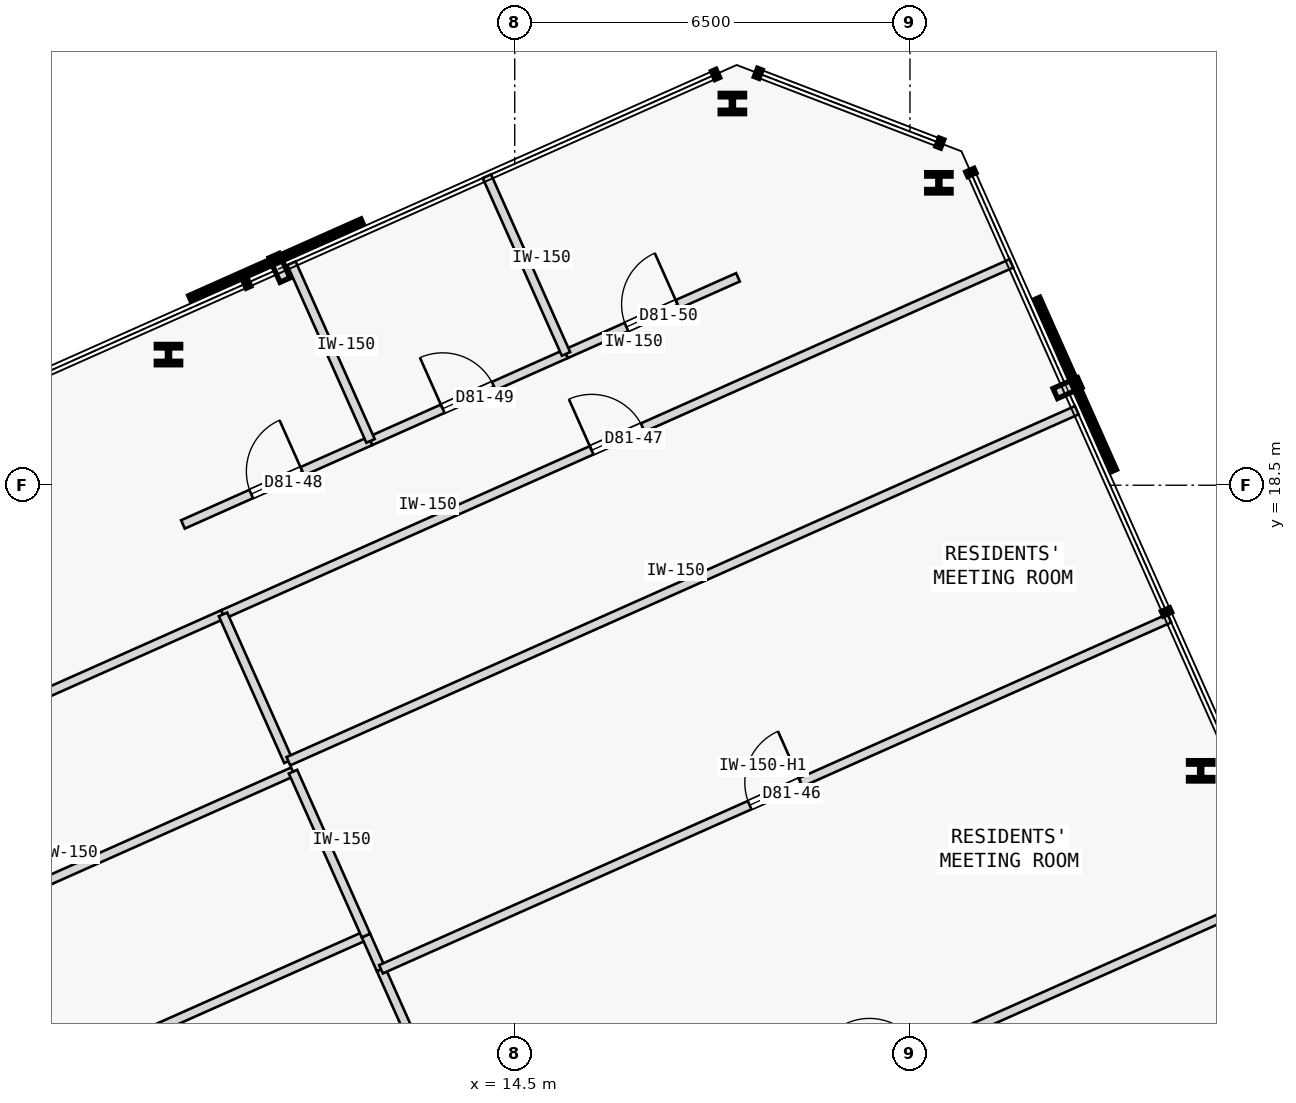
"""IFC4 building model, lengths in metres.
Left out: names, types, materials, properties, quantities, classifications, styles, units other than length and angle.
Written with IfcOpenShell. Run it as: python <this file> out.ifc"""

import sys

from ifc_helpers import new_model, si_unit, direction, frame, frame_2d, origin, origin_2d, place, context, subcontext, project, spatial, rectangle, i_section, extrude, element, fill, save


model = new_model("IFC4")
c1 = context("Model", 3, precision=1e-05, world=origin(), true_north=direction((0.0, 1.0)))
c2 = subcontext(c1, "Body", "Model", "MODEL_VIEW")
j1 = project(units=[si_unit("LENGTHUNIT", "METRE"), si_unit("PLANEANGLEUNIT", "RADIAN")], contexts=[c1])
p1 = place(None, origin())
s1 = spatial("IfcSite", under=j1, at=p1, CompositionType="ELEMENT")
p2 = place(p1, origin())
s2 = spatial("IfcBuilding", under=s1, at=p2, CompositionType="ELEMENT")
p3 = place(p2, frame((0.0, 0.0, 302.0)))
s3 = spatial("IfcBuildingStorey", under=s2, at=p3, CompositionType="ELEMENT", Elevation=302.0)
for number, where, z_axis, x_axis in (
    (1, (25.781, 13.803, 0.0), (0.0, 0.0, 1.0), (1.0, 0.0, 0.0)),
    (2, (21.476, 23.473, 0.0), (0.0, 0.0, 1.0), (1.0, 0.0, 0.0)),
    (3, (18.08, 24.777, 0.0), (0.0, 0.0, 1.0), (1.0, 0.0, 0.0)),
    (4, (8.806, 20.648, 0.0), (0.0, 0.0, 1.0), (1.0, 0.0, 0.0)),
):
    element("IfcColumn", number, at=place(p3, frame(where, z_axis=z_axis, x_axis=x_axis)), inside=s3, PredefinedType="COLUMN", context=c2, shape_type="SweptSolid", body=[
        extrude(i_section(OverallWidth=0.401, OverallDepth=0.335, WebThickness=0.036, FlangeThickness=0.058, FilletRadius=0.015, at=origin_2d()), origin(), (0.0, 0.0, 1.0), 3.55),
    ])
p4 = place(p3, frame((3.7, 13.703, 0.0), z_axis=(0.0, 0.0, 1.0), x_axis=(0.913549363376, 0.406727870542, 0.0)))
e5 = element("IfcWall", 5, at=p4, inside=s3, PredefinedType="PARTITIONING", context=c2, shape_type="SweptSolid", body=[
    extrude(rectangle(XDim=6.571, YDim=0.15, at=frame_2d((3.286, 0.0))), origin(), (0.0, 0.0, 1.0), 3.145),
])
p5 = place(p3, frame((9.703, 16.375, 0.0), z_axis=(0.0, 0.0, 1.0), x_axis=(0.913544622417, 0.406738519018, 0.0)))
e6 = element("IfcWall", 6, at=p5, inside=s3, PredefinedType="PARTITIONING", context=c2, shape_type="SweptSolid", body=[
    extrude(rectangle(XDim=14.192, YDim=0.15, at=frame_2d((7.096, 0.0))), origin(), (0.0, 0.0, 1.0), 3.145),
])
p6 = place(p5, frame((6.636, 0.0, 0.0)))
e7 = element("IfcOpeningElement", 7, at=p6, cuts=e6, PredefinedType="OPENING", context=c2, shape_type="SweptSolid", body=[
    extrude(rectangle(XDim=0.92, YDim=2.04, at=frame_2d((0.46, 1.02))), frame((0.0, 0.085, 0.0), z_axis=(0.0, -1.0, 0.0), x_axis=(1.0, 0.0, 0.0)), (0.0, 0.0, 1.0), 0.17),
])
p7 = place(p3, frame((9.044, 17.855, 0.0), z_axis=(0.0, 0.0, 1.0), x_axis=(0.913554990523, 0.406715231201, 0.0)))
e8 = element("IfcWall", 8, at=p7, inside=s3, PredefinedType="PARTITIONING", context=c2, shape_type="SweptSolid", body=[
    extrude(rectangle(XDim=3.377, YDim=0.15, at=frame_2d((1.688, 0.0))), origin(), (0.0, 0.0, 1.0), 3.145),
])
p8 = place(p7, frame((1.229, 0.0, 0.0)))
e9 = element("IfcOpeningElement", 9, at=p8, cuts=e8, PredefinedType="OPENING", context=c2, shape_type="SweptSolid", body=[
    extrude(rectangle(XDim=0.92, YDim=2.04, at=frame_2d((0.46, 1.02))), frame((0.0, 0.085, 0.0), z_axis=(0.0, -1.0, 0.0), x_axis=(1.0, 0.0, 0.0)), (0.0, 0.0, 1.0), 0.17),
])
p9 = place(p3, frame((12.129, 19.229, 0.0), z_axis=(0.0, 0.0, 1.0), x_axis=(0.913545210441, 0.406737198298, 0.0)))
e10 = element("IfcWall", 10, at=p9, inside=s3, PredefinedType="PARTITIONING", context=c2, shape_type="SweptSolid", body=[
    extrude(rectangle(XDim=3.518, YDim=0.15, at=frame_2d((1.759, 0.0))), origin(), (0.0, 0.0, 1.0), 3.145),
])
p10 = place(p9, frame((1.299, 0.0, 0.0)))
e11 = element("IfcOpeningElement", 11, at=p10, cuts=e10, PredefinedType="OPENING", context=c2, shape_type="SweptSolid", body=[
    extrude(rectangle(XDim=0.92, YDim=2.04, at=frame_2d((0.46, 1.02))), frame((0.0, 0.085, 0.0), z_axis=(0.0, -1.0, 0.0), x_axis=(1.0, 0.0, 0.0)), (0.0, 0.0, 1.0), 0.17),
])
p11 = place(p3, frame((15.343, 20.66, 0.0), z_axis=(0.0, 0.0, 1.0), x_axis=(0.913531658173, 0.406767635778, 0.0)))
e12 = element("IfcWall", 12, at=p11, inside=s3, PredefinedType="PARTITIONING", context=c2, shape_type="SweptSolid", body=[
    extrude(rectangle(XDim=3.096, YDim=0.15, at=frame_2d((1.548, 0.0))), origin(), (0.0, 0.0, 1.0), 3.145),
])
p12 = place(p11, frame((1.088, 0.0, 0.0)))
e13 = element("IfcOpeningElement", 13, at=p12, cuts=e12, PredefinedType="OPENING", context=c2, shape_type="SweptSolid", body=[
    extrude(rectangle(XDim=0.92, YDim=2.04, at=frame_2d((0.46, 1.02))), frame((0.0, 0.085, 0.0), z_axis=(0.0, -1.0, 0.0), x_axis=(1.0, 0.0, 0.0)), (0.0, 0.0, 1.0), 0.17),
])
p13 = place(p3, frame((3.7, 7.376, 0.0), z_axis=(0.0, 0.0, 1.0), x_axis=(0.91354490899, 0.406737875367, 0.0)))
e14 = element("IfcWall", 14, at=p13, inside=s3, PredefinedType="PARTITIONING", context=c2, shape_type="SweptSolid", body=[
    extrude(rectangle(XDim=9.144, YDim=0.15, at=frame_2d((4.572, 0.0))), origin(), (0.0, 0.0, 1.0), 3.145),
])
p14 = place(p3, frame((13.109, 8.726, 0.0), z_axis=(0.0, 0.0, 1.0), x_axis=(-0.406788519224, 0.913522359128, 0.0)))
e15 = element("IfcWall", 15, at=p14, inside=s3, PredefinedType="PARTITIONING", context=c2, shape_type="SweptSolid", body=[
    extrude(rectangle(XDim=1.986, YDim=0.15, at=frame_2d((0.993, 0.0))), origin(), (0.0, 0.0, 1.0), 3.145),
])
p15 = place(p3, frame((12.301, 10.54, 0.0), z_axis=(0.0, 0.0, 1.0), x_axis=(-0.406436552015, 0.913679007741, 0.0)))
e16 = element("IfcWall", 16, at=p15, inside=s3, PredefinedType="PARTITIONING", context=c2, shape_type="SweptSolid", body=[
    extrude(rectangle(XDim=0.608, YDim=0.15, at=frame_2d((0.304, 0.0))), origin(), (0.0, 0.0, 1.0), 3.145),
])
p16 = place(p3, frame((3.7, 10.604, 0.0), z_axis=(0.0, 0.0, 1.0), x_axis=(0.913534926439, 0.406760295722, 0.0)))
e17 = element("IfcWall", 17, at=p16, inside=s3, PredefinedType="PARTITIONING", context=c2, shape_type="SweptSolid", body=[
    extrude(rectangle(XDim=7.831, YDim=0.15, at=frame_2d((3.916, 0.0))), origin(), (0.0, 0.0, 1.0), 3.145),
])
p17 = place(p3, frame((12.054, 11.095, 0.0), z_axis=(0.0, 0.0, 1.0), x_axis=(-0.406798922371, 0.91351772657, 0.0)))
e18 = element("IfcWall", 18, at=p17, inside=s3, PredefinedType="PARTITIONING", context=c2, shape_type="SweptSolid", body=[
    extrude(rectangle(XDim=2.949, YDim=0.15, at=frame_2d((1.475, 0.0))), origin(), (0.0, 0.0, 1.0), 3.145),
])
p18 = place(p3, frame((10.778, 13.961, 0.0), z_axis=(0.0, 0.0, 1.0), x_axis=(-0.406712614091, 0.913556155657, 0.0)))
e19 = element("IfcWall", 19, at=p18, inside=s3, PredefinedType="PARTITIONING", context=c2, shape_type="SweptSolid", body=[
    extrude(rectangle(XDim=2.643, YDim=0.15, at=frame_2d((1.322, 0.0))), origin(), (0.0, 0.0, 1.0), 3.145),
])
p19 = place(p3, frame((14.272, 6.113, 0.0), z_axis=(0.0, 0.0, 1.0), x_axis=(0.913551014388, 0.406724162191, 0.0)))
e20 = element("IfcWall", 20, at=p19, inside=s3, PredefinedType="PARTITIONING", context=c2, shape_type="SweptSolid", body=[
    extrude(rectangle(XDim=14.192, YDim=0.15, at=frame_2d((7.096, 0.0))), origin(), (0.0, 0.0, 1.0), 3.145),
])
p20 = place(p19, frame((6.636, 0.0, 0.0)))
e21 = element("IfcOpeningElement", 21, at=p20, cuts=e20, PredefinedType="OPENING", context=c2, shape_type="SweptSolid", body=[
    extrude(rectangle(XDim=0.92, YDim=2.04, at=frame_2d((0.46, 1.02))), frame((0.0, 0.085, 0.0), z_axis=(0.0, -1.0, 0.0), x_axis=(1.0, 0.0, 0.0)), (0.0, 0.0, 1.0), 0.17),
])
p21 = place(p3, frame((12.301, 10.54, 0.0), z_axis=(0.0, 0.0, 1.0), x_axis=(0.913544622417, 0.406738519018, 0.0)))
e22 = element("IfcWall", 22, at=p21, inside=s3, PredefinedType="PARTITIONING", context=c2, shape_type="SweptSolid", body=[
    extrude(rectangle(XDim=14.192, YDim=0.15, at=frame_2d((7.096, 0.0))), origin(), (0.0, 0.0, 1.0), 2.695),
])
p22 = place(p21, frame((6.636, 0.0, 0.0)))
e23 = element("IfcOpeningElement", 23, at=p22, cuts=e22, PredefinedType="OPENING", context=c2, shape_type="SweptSolid", body=[
    extrude(rectangle(XDim=0.92, YDim=2.04, at=frame_2d((0.46, 1.02))), frame((0.0, 0.085, 0.0), z_axis=(0.0, -1.0, 0.0), x_axis=(1.0, 0.0, 0.0)), (0.0, 0.0, 1.0), 0.17),
])
p23 = place(p3, frame((10.778, 13.961, 0.0), z_axis=(0.0, 0.0, 1.0), x_axis=(0.913544622417, 0.406738519018, 0.0)))
e24 = element("IfcWall", 24, at=p23, inside=s3, PredefinedType="PARTITIONING", context=c2, shape_type="SweptSolid", body=[
    extrude(rectangle(XDim=14.192, YDim=0.15, at=frame_2d((7.096, 0.0))), origin(), (0.0, 0.0, 1.0), 3.145),
])
for number, where, z_axis, x_axis in (
    (25, (12.129, 19.229, 0.0), (0.0, 0.0, 1.0), (-0.407, 0.914, 0.0)),
    (26, (15.343, 20.66, 0.0), (0.0, 0.0, 1.0), (-0.407, 0.914, 0.0)),
):
    element("IfcWall", number, at=place(p3, frame(where, z_axis=z_axis, x_axis=x_axis)), inside=s3, PredefinedType="PARTITIONING", context=c2, shape_type="SweptSolid", body=[
        extrude(rectangle(XDim=3.198, YDim=0.15, at=frame_2d((1.599, 0.0))), origin(), (0.0, 0.0, 1.0), 3.145),
    ])
p24 = place(p22, origin())
e27 = element("IfcDoor", 27, at=p24, inside=s3, OperationType="SINGLE_SWING_RIGHT", PredefinedType="DOOR", context=c2, shape_type="SweptSolid", body=[
    extrude(rectangle(XDim=0.92, YDim=2.04, at=frame_2d((0.46, 1.02))), frame((0.0, 0.025, 0.0), z_axis=(0.0, -1.0, 0.0), x_axis=(1.0, 0.0, 0.0)), (0.0, 0.0, 1.0), 0.05),
])
fill(e23, e27)
p25 = place(p6, origin())
e28 = element("IfcDoor", 28, at=p25, inside=s3, OperationType="SINGLE_SWING_LEFT", PredefinedType="DOOR", context=c2, shape_type="SweptSolid", body=[
    extrude(rectangle(XDim=0.92, YDim=2.04, at=frame_2d((0.46, 1.02))), frame((0.0, 0.025, 0.0), z_axis=(0.0, -1.0, 0.0), x_axis=(1.0, 0.0, 0.0)), (0.0, 0.0, 1.0), 0.05),
])
fill(e7, e28)
p26 = place(p8, origin())
e29 = element("IfcDoor", 29, at=p26, inside=s3, OperationType="SINGLE_SWING_RIGHT", PredefinedType="DOOR", context=c2, shape_type="SweptSolid", body=[
    extrude(rectangle(XDim=0.92, YDim=2.04, at=frame_2d((0.46, 1.02))), frame((0.0, 0.025, 0.0), z_axis=(0.0, -1.0, 0.0), x_axis=(1.0, 0.0, 0.0)), (0.0, 0.0, 1.0), 0.05),
])
fill(e9, e29)
p27 = place(p10, origin())
e30 = element("IfcDoor", 30, at=p27, inside=s3, OperationType="SINGLE_SWING_LEFT", PredefinedType="DOOR", context=c2, shape_type="SweptSolid", body=[
    extrude(rectangle(XDim=0.92, YDim=2.04, at=frame_2d((0.46, 1.02))), frame((0.0, 0.025, 0.0), z_axis=(0.0, -1.0, 0.0), x_axis=(1.0, 0.0, 0.0)), (0.0, 0.0, 1.0), 0.05),
])
fill(e11, e30)
p28 = place(p12, origin())
e31 = element("IfcDoor", 31, at=p28, inside=s3, OperationType="SINGLE_SWING_RIGHT", PredefinedType="DOOR", context=c2, shape_type="SweptSolid", body=[
    extrude(rectangle(XDim=0.92, YDim=2.04, at=frame_2d((0.46, 1.02))), frame((0.0, 0.025, 0.0), z_axis=(0.0, -1.0, 0.0), x_axis=(1.0, 0.0, 0.0)), (0.0, 0.0, 1.0), 0.05),
])
fill(e13, e31)
save(model, sys.argv[1])
